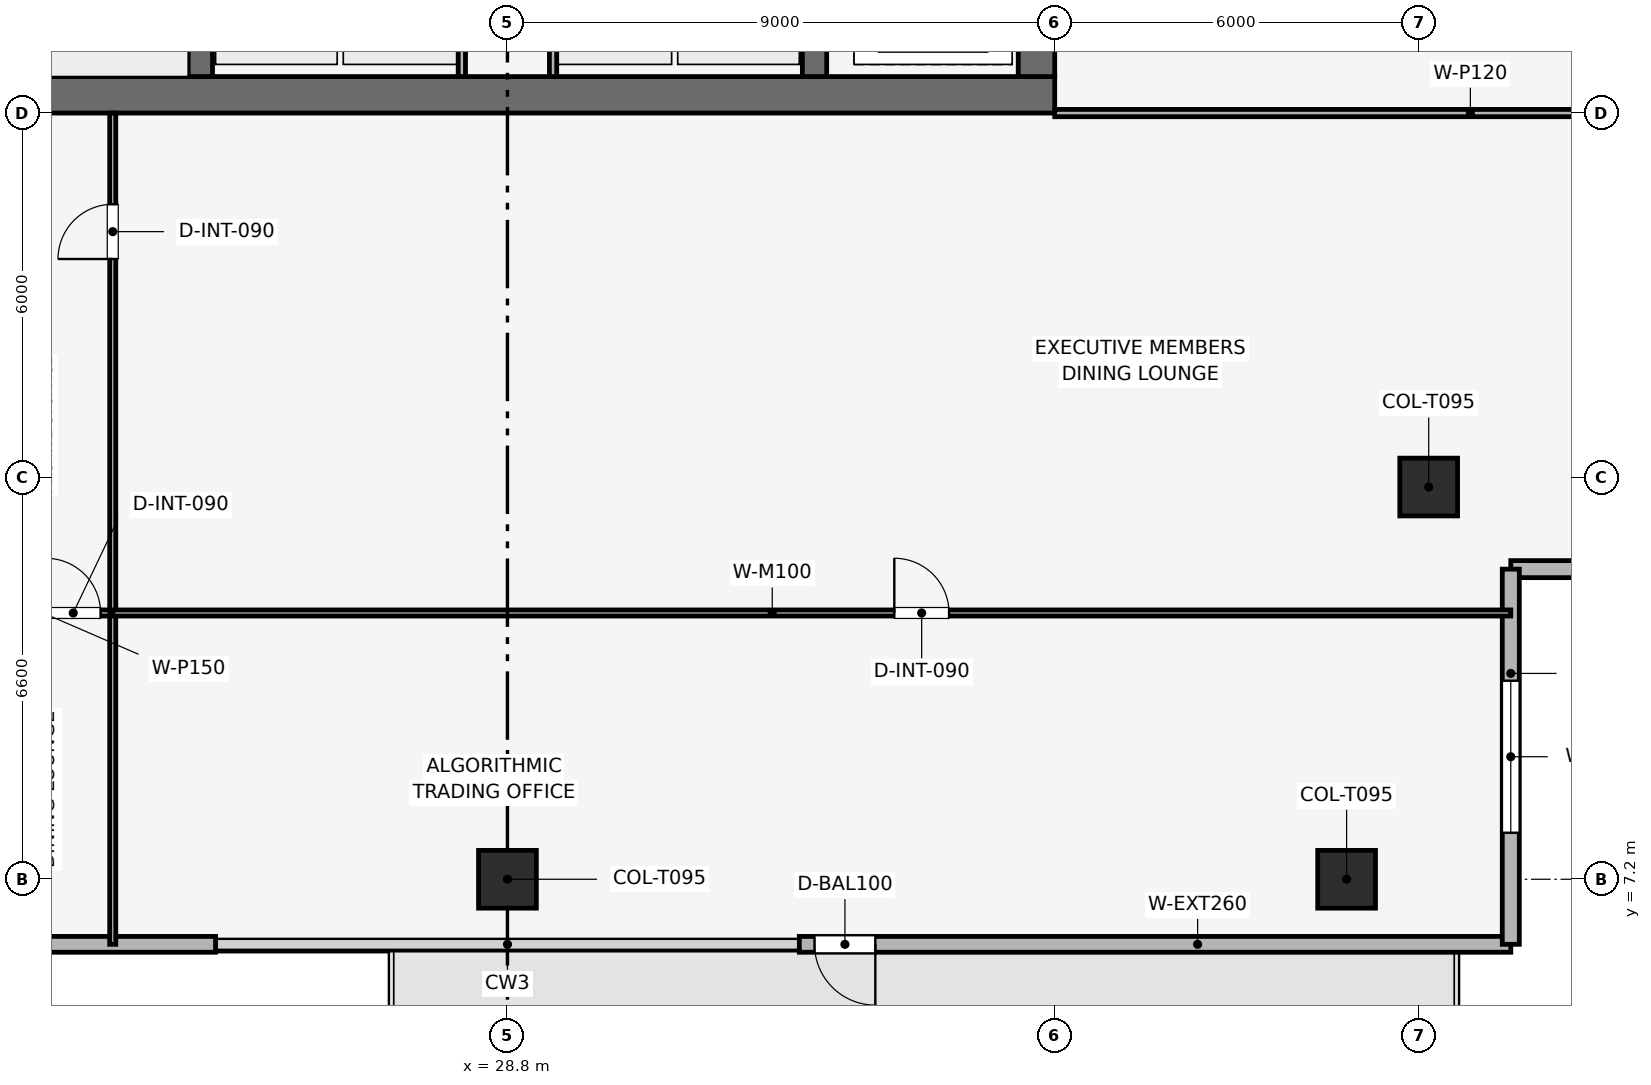
"""IFC4 building model, lengths in metres.
Left out: names, types, materials, properties, quantities, classifications, styles, units other than length and angle.
Written with IfcOpenShell. Run it as: python <this file> out.ifc"""

import sys

from ifc_helpers import new_model, si_unit, direction, frame, frame_2d, origin, origin_2d, place, context, subcontext, project, spatial, rectangle, extrude, element, fill, save


model = new_model("IFC4")
c1 = context("Model", 3, precision=1e-05, world=origin(), true_north=direction((0.0, 1.0)))
c2 = subcontext(c1, "Body", "Model", "MODEL_VIEW")
j1 = project(units=[si_unit("LENGTHUNIT", "METRE"), si_unit("PLANEANGLEUNIT", "RADIAN")], contexts=[c1])
p1 = place(None, origin())
s1 = spatial("IfcSite", under=j1, at=p1, CompositionType="ELEMENT")
p2 = place(p1, origin())
s2 = spatial("IfcBuilding", under=s1, at=p2, CompositionType="ELEMENT")
p3 = place(p2, frame((0.0, 0.0, 306.75)))
s3 = spatial("IfcBuildingStorey", under=s2, at=p3, CompositionType="ELEMENT", Elevation=306.75)
p4 = place(p3, frame((19.8, 20.1, 0.0), z_axis=(0.0, 0.0, 1.0), x_axis=(1.0, 0.0, 0.0)))
e1 = element("IfcWall", 1, at=p4, inside=s3, PredefinedType="SHEAR", context=c2, shape_type="SweptSolid", body=[
    extrude(rectangle(XDim=18.0, YDim=0.6, at=frame_2d((9.0, 0.0))), origin(), (0.0, 0.0, 1.0), 3.75),
])
p5 = place(p3, frame((37.5, 20.4, 0.0), z_axis=(0.0, 0.0, 1.0), x_axis=(0.0, 1.0, 0.0)))
e2 = element("IfcWall", 2, at=p5, inside=s3, PredefinedType="SHEAR", context=c2, shape_type="SweptSolid", body=[
    extrude(rectangle(XDim=16.8, YDim=0.6, at=frame_2d((8.4, 0.0))), origin(), (0.0, 0.0, 1.0), 3.75),
])
p6 = place(p5, frame((4.9, 0.0, 0.0)))
e3 = element("IfcOpeningElement", 3, at=p6, cuts=e2, PredefinedType="OPENING", context=c2, shape_type="SweptSolid", body=[
    extrude(rectangle(XDim=1.1, YDim=2.15, at=frame_2d((0.55, 1.075))), frame((0.0, 0.31, 0.0), z_axis=(0.0, -1.0, 0.0), x_axis=(1.0, 0.0, 0.0)), (0.0, 0.0, 1.0), 0.62),
])
for number, where, z_axis, x_axis in (
    (4, (23.75, 20.4, 0.0), (0.0, 0.0, 1.0), (0.0, 1.0, 0.0)),
    (5, (33.85, 20.4, 0.0), (0.0, 0.0, 1.0), (0.0, 1.0, 0.0)),
):
    element("IfcWall", number, at=place(p3, frame(where, z_axis=z_axis, x_axis=x_axis)), inside=s3, PredefinedType="SHEAR", context=c2, shape_type="SweptSolid", body=[
        extrude(rectangle(XDim=16.8, YDim=0.4, at=frame_2d((8.4, 0.0))), origin(), (0.0, 0.0, 1.0), 3.75),
    ])
for number, where, z_axis, x_axis in (
    (6, (28.8, 7.2, 0.003), (0.0, 0.0, 1.0), (1.0, 0.0, 0.0)),
    (7, (42.6, 7.2, 0.003), (0.0, 0.0, 1.0), (1.0, 0.0, 0.0)),
    (8, (43.95, 13.65, 0.003), (0.0, 0.0, 1.0), (1.0, 0.0, 0.0)),
):
    element("IfcColumn", number, at=place(p3, frame(where, z_axis=z_axis, x_axis=x_axis)), inside=s3, PredefinedType="COLUMN", context=c2, shape_type="SweptSolid", body=[
        extrude(rectangle(XDim=0.95, YDim=0.95, at=origin_2d()), origin(), (0.0, 0.0, 1.0), 3.504),
    ])
p7 = place(p3, frame((45.3, 6.13, 0.0), z_axis=(0.0, 0.0, 1.0), x_axis=(-1.0, 0.0, 0.0)))
e9 = element("IfcWall", 9, at=p7, inside=s3, PredefinedType="SOLIDWALL", context=c2, shape_type="SweptSolid", body=[
    extrude(rectangle(XDim=11.7, YDim=0.26, at=frame_2d((5.85, 0.0))), origin(), (0.0, 0.0, 1.0), 3.51),
])
p8 = place(p7, frame((10.45, 0.0, 0.0)))
e10 = element("IfcOpeningElement", 10, at=p8, cuts=e9, PredefinedType="OPENING", context=c2, shape_type="SweptSolid", body=[
    extrude(rectangle(XDim=1.0, YDim=2.2, at=frame_2d((0.5, 1.1))), frame((0.0, 0.14, 0.0), z_axis=(0.0, -1.0, 0.0), x_axis=(1.0, 0.0, 0.0)), (0.0, 0.0, 1.0), 0.28),
])
p9 = place(p3, frame((24.0, 6.13, 0.0), z_axis=(0.0, 0.0, 1.0), x_axis=(-1.0, 0.0, 0.0)))
e11 = element("IfcWall", 11, at=p9, inside=s3, PredefinedType="SOLIDWALL", context=c2, shape_type="SweptSolid", body=[
    extrude(rectangle(XDim=11.7, YDim=0.26, at=frame_2d((5.85, 0.0))), origin(), (0.0, 0.0, 1.0), 3.51),
])
p10 = place(p9, frame((5.964, 0.0, 0.9)))
e12 = element("IfcOpeningElement", 12, at=p10, cuts=e11, PredefinedType="OPENING", context=c2, shape_type="SweptSolid", body=[
    extrude(rectangle(XDim=1.2, YDim=2.1, at=frame_2d((0.6, 1.05))), frame((0.0, 0.14, 0.0), z_axis=(0.0, -1.0, 0.0), x_axis=(1.0, 0.0, 0.0)), (0.0, 0.0, 1.0), 0.28),
])
p11 = place(p3, frame((51.47, 12.3, 0.0), z_axis=(0.0, 0.0, 1.0), x_axis=(-1.0, 0.0, 0.0)))
e13 = element("IfcWall", 13, at=p11, inside=s3, PredefinedType="SOLIDWALL", context=c2, shape_type="SweptSolid", body=[
    extrude(rectangle(XDim=6.17, YDim=0.28, at=frame_2d((3.085, 0.0))), origin(), (0.0, 0.0, 1.0), 3.51),
])
p12 = place(p11, frame((1.835, 0.0, 0.9)))
e14 = element("IfcOpeningElement", 14, at=p12, cuts=e13, PredefinedType="OPENING", context=c2, shape_type="SweptSolid", body=[
    extrude(rectangle(XDim=2.5, YDim=1.9, at=frame_2d((1.25, 0.95))), frame((0.0, 0.15, 0.0), z_axis=(0.0, -1.0, 0.0), x_axis=(1.0, 0.0, 0.0)), (0.0, 0.0, 1.0), 0.3),
])
p13 = place(p3, frame((45.3, 12.3, 0.0), z_axis=(0.0, 0.0, 1.0), x_axis=(0.0, -1.0, 0.0)))
e15 = element("IfcWall", 15, at=p13, inside=s3, PredefinedType="SOLIDWALL", context=c2, shape_type="SweptSolid", body=[
    extrude(rectangle(XDim=6.17, YDim=0.28, at=frame_2d((3.085, 0.0))), origin(), (0.0, 0.0, 1.0), 3.51),
])
p14 = place(p13, frame((1.835, 0.0, 0.9)))
e16 = element("IfcOpeningElement", 16, at=p14, cuts=e15, PredefinedType="OPENING", context=c2, shape_type="SweptSolid", body=[
    extrude(rectangle(XDim=2.5, YDim=1.9, at=frame_2d((1.25, 0.95))), frame((0.0, 0.15, 0.0), z_axis=(0.0, -1.0, 0.0), x_axis=(1.0, 0.0, 0.0)), (0.0, 0.0, 1.0), 0.3),
])
for number, where, z_axis, x_axis in (
    (17, (28.05, 20.4, 0.0), (0.0, 0.0, 1.0), (0.0, 1.0, 0.0)),
    (18, (29.55, 20.4, 0.0), (0.0, 0.0, 1.0), (0.0, 1.0, 0.0)),
):
    element("IfcWall", number, at=place(p3, frame(where, z_axis=z_axis, x_axis=x_axis)), inside=s3, PredefinedType="PARTITIONING", context=c2, shape_type="SweptSolid", body=[
        extrude(rectangle(XDim=8.15, YDim=0.12, at=frame_2d((4.075, 0.0))), origin(), (0.0, 0.0, 1.0), 3.51),
    ])
p15 = place(p3, frame((19.8, 11.579, 0.0), z_axis=(0.0, 0.0, 1.0), x_axis=(1.0, 0.0, 0.0)))
e19 = element("IfcWall", 19, at=p15, inside=s3, PredefinedType="MOVABLE", context=c2, shape_type="SweptSolid", body=[
    extrude(rectangle(XDim=2.509, YDim=0.1, at=frame_2d((1.254, 0.0))), origin(), (0.0, 0.0, 1.0), 3.095),
])
p16 = place(p15, frame((1.409, 0.0, 0.0)))
e20 = element("IfcOpeningElement", 20, at=p16, cuts=e19, PredefinedType="OPENING", context=c2, shape_type="SweptSolid", body=[
    extrude(rectangle(XDim=0.9, YDim=2.1, at=frame_2d((0.45, 1.05))), frame((0.0, 0.06, 0.0), z_axis=(0.0, -1.0, 0.0), x_axis=(1.0, 0.0, 0.0)), (0.0, 0.0, 1.0), 0.12),
])
p17 = place(p3, frame((22.309, 6.13, 0.0), z_axis=(0.0, 0.0, 1.0), x_axis=(0.0, 1.0, 0.0)))
e21 = element("IfcWall", 21, at=p17, inside=s3, PredefinedType="MOVABLE", context=c2, shape_type="SweptSolid", body=[
    extrude(rectangle(XDim=13.67, YDim=0.1, at=frame_2d((6.835, 0.0))), origin(), (0.0, 0.0, 1.0), 3.135),
])
p18 = place(p17, frame((11.27, 0.0, 0.0)))
e22 = element("IfcOpeningElement", 22, at=p18, cuts=e21, PredefinedType="OPENING", context=c2, shape_type="SweptSolid", body=[
    extrude(rectangle(XDim=0.9, YDim=2.1, at=frame_2d((0.45, 1.05))), frame((0.0, 0.06, 0.0), z_axis=(0.0, -1.0, 0.0), x_axis=(1.0, 0.0, 0.0)), (0.0, 0.0, 1.0), 0.12),
])
p19 = place(p3, frame((22.309, 11.579, 0.0), z_axis=(0.0, 0.0, 1.0), x_axis=(1.0, 0.0, 0.0)))
e23 = element("IfcWall", 23, at=p19, inside=s3, PredefinedType="MOVABLE", context=c2, shape_type="SweptSolid", body=[
    extrude(rectangle(XDim=22.991, YDim=0.1, at=frame_2d((11.496, 0.0))), origin(), (0.0, 0.0, 1.0), 3.095),
])
p20 = place(p19, frame((12.853, 0.0, 0.0)))
e24 = element("IfcOpeningElement", 24, at=p20, cuts=e23, PredefinedType="OPENING", context=c2, shape_type="SweptSolid", body=[
    extrude(rectangle(XDim=0.9, YDim=2.1, at=frame_2d((0.45, 1.05))), frame((0.0, 0.06, 0.0), z_axis=(0.0, -1.0, 0.0), x_axis=(1.0, 0.0, 0.0)), (0.0, 0.0, 1.0), 0.12),
])
p21 = place(p3, frame((37.8, 19.8, 0.0), z_axis=(0.0, 0.0, 1.0), x_axis=(1.0, 0.0, 0.0)))
e25 = element("IfcWall", 25, at=p21, inside=s3, PredefinedType="PARTITIONING", context=c2, shape_type="SweptSolid", body=[
    extrude(rectangle(XDim=13.67, YDim=0.12, at=frame_2d((6.835, 0.0))), origin(), (0.0, 0.0, 1.0), 3.095),
])
p22 = place(p8, origin())
e26 = element("IfcDoor", 26, at=p22, inside=s3, OperationType="SINGLE_SWING_LEFT", PredefinedType="DOOR", context=c2, shape_type="SweptSolid", body=[
    extrude(rectangle(XDim=1.0, YDim=2.2, at=frame_2d((0.5, 1.1))), frame((0.0, 0.025, 0.0), z_axis=(0.0, -1.0, 0.0), x_axis=(1.0, 0.0, 0.0)), (0.0, 0.0, 1.0), 0.05),
])
fill(e10, e26)
p23 = place(p14, origin())
e27 = element("IfcWindow", 27, at=p23, inside=s3, PartitioningType="SINGLE_PANEL", PredefinedType="WINDOW", context=c2, shape_type="SweptSolid", body=[
    extrude(rectangle(XDim=2.5, YDim=1.9, at=frame_2d((1.25, 0.95))), frame((0.0, 0.03, 0.0), z_axis=(0.0, -1.0, 0.0), x_axis=(1.0, 0.0, 0.0)), (0.0, 0.0, 1.0), 0.06),
])
fill(e16, e27)
p24 = place(p16, origin())
e28 = element("IfcDoor", 28, at=p24, inside=s3, OperationType="SINGLE_SWING_LEFT", PredefinedType="DOOR", context=c2, shape_type="SweptSolid", body=[
    extrude(rectangle(XDim=0.9, YDim=2.1, at=frame_2d((0.45, 1.05))), frame((0.0, 0.025, 0.0), z_axis=(0.0, -1.0, 0.0), x_axis=(1.0, 0.0, 0.0)), (0.0, 0.0, 1.0), 0.05),
])
fill(e20, e28)
p25 = place(p18, origin())
e29 = element("IfcDoor", 29, at=p25, inside=s3, OperationType="SINGLE_SWING_LEFT", PredefinedType="DOOR", context=c2, shape_type="SweptSolid", body=[
    extrude(rectangle(XDim=0.9, YDim=2.1, at=frame_2d((0.45, 1.05))), frame((0.0, 0.025, 0.0), z_axis=(0.0, -1.0, 0.0), x_axis=(1.0, 0.0, 0.0)), (0.0, 0.0, 1.0), 0.05),
])
fill(e22, e29)
p26 = place(p20, origin())
e30 = element("IfcDoor", 30, at=p26, inside=s3, OperationType="SINGLE_SWING_LEFT", PredefinedType="DOOR", context=c2, shape_type="SweptSolid", body=[
    extrude(rectangle(XDim=0.9, YDim=2.1, at=frame_2d((0.45, 1.05))), frame((0.0, 0.025, 0.0), z_axis=(0.0, -1.0, 0.0), x_axis=(1.0, 0.0, 0.0)), (0.0, 0.0, 1.0), 0.05),
])
fill(e24, e30)
save(model, sys.argv[1])
